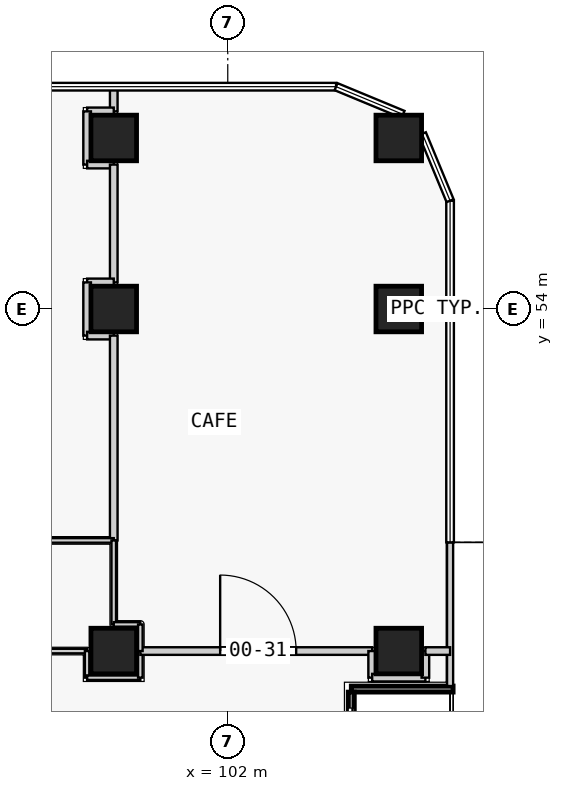
"""IFC4 building model, lengths in metres.
Left out: names, types, materials, properties, quantities, classifications, styles, units other than length and angle.
Written with IfcOpenShell. Run it as: python <this file> out.ifc"""

import sys

from ifc_helpers import new_model, si_unit, direction, frame, frame_2d, origin, origin_2d, place, context, subcontext, project, spatial, rectangle, extrude, element, fill, save


model = new_model("IFC4")
c1 = context("Model", 3, precision=1e-05, world=origin(), true_north=direction((0.0, 1.0)))
c2 = subcontext(c1, "Body", "Model", "MODEL_VIEW")
j1 = project(units=[si_unit("LENGTHUNIT", "METRE"), si_unit("PLANEANGLEUNIT", "RADIAN")], contexts=[c1])
p1 = place(None, origin())
s1 = spatial("IfcSite", under=j1, at=p1, CompositionType="ELEMENT")
p2 = place(p1, origin())
s2 = spatial("IfcBuilding", under=s1, at=p2, CompositionType="ELEMENT")
p3 = place(p2, origin())
s3 = spatial("IfcBuildingStorey", under=s2, at=p3, CompositionType="ELEMENT", Elevation=0.0)
for number, where, z_axis, x_axis in (
    (1, (99.0, 45.0, 0.0), (0.0, 0.0, 1.0), (1.0, 0.0, 0.0)),
    (2, (99.0, 54.0, 0.0), (0.0, 0.0, 1.0), (1.0, 0.0, 0.0)),
    (3, (99.0, 58.5, 0.0), (0.0, 0.0, 1.0), (1.0, 0.0, 0.0)),
    (4, (106.5, 45.0, 0.0), (0.0, 0.0, 1.0), (1.0, 0.0, 0.0)),
    (5, (106.5, 54.0, 0.0), (0.0, 0.0, 1.0), (1.0, 0.0, 0.0)),
    (6, (106.5, 58.5, 0.0), (0.0, 0.0, 1.0), (1.0, 0.0, 0.0)),
):
    element("IfcColumn", number, at=place(p3, frame(where, z_axis=z_axis, x_axis=x_axis)), inside=s3, PredefinedType="COLUMN", context=c2, shape_type="SweptSolid", body=[
        extrude(rectangle(XDim=1.2, YDim=1.2, at=origin_2d()), origin(), (0.0, 0.0, 1.0), 8.0),
    ])
p4 = place(p3, frame((105.25, 43.92, 0.0), z_axis=(0.0, 0.0, 1.0), x_axis=(0.0, -1.0, 0.0)))
e7 = element("IfcWall", 7, at=p4, inside=s3, PredefinedType="STANDARD", context=c2, shape_type="SweptSolid", body=[
    extrude(rectangle(XDim=6.84, YDim=0.16, at=frame_2d((3.42, 0.0))), origin(), (0.0, 0.0, 1.0), 7.65),
])
p5 = place(p4, frame((0.42, 0.0, 0.0)))
e8 = element("IfcOpeningElement", 8, at=p5, cuts=e7, PredefinedType="OPENING", context=c2, shape_type="SweptSolid", body=[
    extrude(rectangle(XDim=3.0, YDim=3.0, at=frame_2d((1.5, 1.5))), frame((0.0, 0.09, 0.0), z_axis=(0.0, -1.0, 0.0), x_axis=(1.0, 0.0, 0.0)), (0.0, 0.0, 1.0), 0.18),
])
p6 = place(p4, frame((3.42, 0.0, 0.0)))
e9 = element("IfcOpeningElement", 9, at=p6, cuts=e7, PredefinedType="OPENING", context=c2, shape_type="SweptSolid", body=[
    extrude(rectangle(XDim=3.0, YDim=3.0, at=frame_2d((1.5, 1.5))), frame((0.0, 0.09, 0.0), z_axis=(0.0, -1.0, 0.0), x_axis=(1.0, 0.0, 0.0)), (0.0, 0.0, 1.0), 0.18),
])
p7 = place(p3, frame((107.93, 44.0, 0.0), z_axis=(0.0, 0.0, 1.0), x_axis=(-1.0, 0.0, 0.0)))
e10 = element("IfcWall", 10, at=p7, inside=s3, PredefinedType="STANDARD", context=c2, shape_type="SweptSolid", body=[
    extrude(rectangle(XDim=2.68, YDim=0.16, at=frame_2d((1.34, 0.0))), origin(), (0.0, 0.0, 1.0), 7.65),
])
p8 = place(p3, frame((107.85, 47.86, 0.0), z_axis=(0.0, 0.0, 1.0), x_axis=(0.0, -1.0, 0.0)))
e11 = element("IfcWall", 11, at=p8, inside=s3, PredefinedType="STANDARD", context=c2, shape_type="SweptSolid", body=[
    extrude(rectangle(XDim=3.78, YDim=0.16, at=frame_2d((1.89, 0.0))), origin(), (0.0, 0.0, 1.0), 7.65),
])
p9 = place(p3, frame((99.0, 59.85, 0.0), z_axis=(0.0, 0.0, 1.0), x_axis=(0.0, -1.0, 0.0)))
e12 = element("IfcWall", 12, at=p9, inside=s3, PredefinedType="PARTITIONING", context=c2, shape_type="SweptSolid", body=[
    extrude(rectangle(XDim=0.65, YDim=0.2, at=frame_2d((0.325, 0.0))), origin(), (0.0, 0.0, 1.0), 7.65),
])
p10 = place(p3, frame((99.0, 59.2, 0.0), z_axis=(0.0, 0.0, 1.0), x_axis=(-1.0, 0.0, 0.0)))
e13 = element("IfcWall", 13, at=p10, inside=s3, PredefinedType="PARTITIONING", context=c2, shape_type="SweptSolid", body=[
    extrude(rectangle(XDim=0.7, YDim=0.2, at=frame_2d((0.35, 0.0))), origin(), (0.0, 0.0, 1.0), 7.65),
])
p11 = place(p3, frame((98.3, 59.2, 0.0), z_axis=(0.0, 0.0, 1.0), x_axis=(0.0, -1.0, 0.0)))
e14 = element("IfcWall", 14, at=p11, inside=s3, PredefinedType="PARTITIONING", context=c2, shape_type="SweptSolid", body=[
    extrude(rectangle(XDim=1.4, YDim=0.2, at=frame_2d((0.7, 0.0))), origin(), (0.0, 0.0, 1.0), 6.95),
])
p12 = place(p3, frame((98.3, 57.8, 0.0), z_axis=(0.0, 0.0, 1.0), x_axis=(1.0, 0.0, 0.0)))
e15 = element("IfcWall", 15, at=p12, inside=s3, PredefinedType="PARTITIONING", context=c2, shape_type="SweptSolid", body=[
    extrude(rectangle(XDim=0.7, YDim=0.2, at=frame_2d((0.35, 0.0))), origin(), (0.0, 0.0, 1.0), 6.95),
])
p13 = place(p3, frame((99.0, 57.8, 0.0), z_axis=(0.0, 0.0, 1.0), x_axis=(0.0, -1.0, 0.0)))
e16 = element("IfcWall", 16, at=p13, inside=s3, PredefinedType="PARTITIONING", context=c2, shape_type="SweptSolid", body=[
    extrude(rectangle(XDim=3.1, YDim=0.2, at=frame_2d((1.55, 0.0))), origin(), (0.0, 0.0, 1.0), 6.95),
])
p14 = place(p3, frame((99.0, 54.7, 0.0), z_axis=(0.0, 0.0, 1.0), x_axis=(-1.0, 0.0, 0.0)))
e17 = element("IfcWall", 17, at=p14, inside=s3, PredefinedType="PARTITIONING", context=c2, shape_type="SweptSolid", body=[
    extrude(rectangle(XDim=0.7, YDim=0.2, at=frame_2d((0.35, 0.0))), origin(), (0.0, 0.0, 1.0), 6.95),
])
p15 = place(p3, frame((98.3, 54.7, 0.0), z_axis=(0.0, 0.0, 1.0), x_axis=(0.0, -1.0, 0.0)))
e18 = element("IfcWall", 18, at=p15, inside=s3, PredefinedType="PARTITIONING", context=c2, shape_type="SweptSolid", body=[
    extrude(rectangle(XDim=1.4, YDim=0.2, at=frame_2d((0.7, 0.0))), origin(), (0.0, 0.0, 1.0), 6.95),
])
p16 = place(p3, frame((98.3, 53.3, 0.0), z_axis=(0.0, 0.0, 1.0), x_axis=(1.0, 0.0, 0.0)))
e19 = element("IfcWall", 19, at=p16, inside=s3, PredefinedType="PARTITIONING", context=c2, shape_type="SweptSolid", body=[
    extrude(rectangle(XDim=0.7, YDim=0.2, at=frame_2d((0.35, 0.0))), origin(), (0.0, 0.0, 1.0), 6.95),
])
p17 = place(p3, frame((99.0, 53.3, 0.0), z_axis=(0.0, 0.0, 1.0), x_axis=(0.0, -1.0, 0.0)))
e20 = element("IfcWall", 20, at=p17, inside=s3, PredefinedType="PARTITIONING", context=c2, shape_type="SweptSolid", body=[
    extrude(rectangle(XDim=5.389, YDim=0.2, at=frame_2d((2.695, 0.0))), origin(), (0.0, 0.0, 1.0), 6.95),
])
p18 = place(p3, frame((90.7, 45.0, 0.0), z_axis=(0.0, 0.0, 1.0), x_axis=(1.0, 0.0, 0.0)))
e21 = element("IfcWall", 21, at=p18, inside=s3, PredefinedType="PARTITIONING", context=c2, shape_type="SweptSolid", body=[
    extrude(rectangle(XDim=7.6, YDim=0.12, at=frame_2d((3.8, 0.0))), origin(), (0.0, 0.0, 1.0), 6.95),
])
p19 = place(p18, frame((3.35, 0.0, 0.0)))
e22 = element("IfcOpeningElement", 22, at=p19, cuts=e21, PredefinedType="OPENING", context=c2, shape_type="SweptSolid", body=[
    extrude(rectangle(XDim=1.0, YDim=2.1, at=frame_2d((0.5, 1.05))), frame((0.0, 0.07, 0.0), z_axis=(0.0, -1.0, 0.0), x_axis=(1.0, 0.0, 0.0)), (0.0, 0.0, 1.0), 0.14),
])
p20 = place(p3, frame((98.3, 45.0, 0.0), z_axis=(0.0, 0.0, 1.0), x_axis=(0.0, -1.0, 0.0)))
e23 = element("IfcWall", 23, at=p20, inside=s3, PredefinedType="PARTITIONING", context=c2, shape_type="SweptSolid", body=[
    extrude(rectangle(XDim=0.7, YDim=0.12, at=frame_2d((0.35, 0.0))), origin(), (0.0, 0.0, 1.0), 6.95),
])
p21 = place(p3, frame((98.3, 44.3, 0.0), z_axis=(0.0, 0.0, 1.0), x_axis=(1.0, 0.0, 0.0)))
e24 = element("IfcWall", 24, at=p21, inside=s3, PredefinedType="PARTITIONING", context=c2, shape_type="SweptSolid", body=[
    extrude(rectangle(XDim=1.4, YDim=0.12, at=frame_2d((0.7, 0.0))), origin(), (0.0, 0.0, 1.0), 6.95),
])
p22 = place(p3, frame((99.7, 44.3, 0.0), z_axis=(0.0, 0.0, 1.0), x_axis=(0.0, 1.0, 0.0)))
e25 = element("IfcWall", 25, at=p22, inside=s3, PredefinedType="PARTITIONING", context=c2, shape_type="SweptSolid", body=[
    extrude(rectangle(XDim=0.7, YDim=0.12, at=frame_2d((0.35, 0.0))), origin(), (0.0, 0.0, 1.0), 6.95),
])
p23 = place(p3, frame((99.0, 47.911, 0.0), z_axis=(0.0, 0.0, 1.0), x_axis=(-1.0, 0.0, 0.0)))
e26 = element("IfcWall", 26, at=p23, inside=s3, PredefinedType="PARTITIONING", context=c2, shape_type="SweptSolid", body=[
    extrude(rectangle(XDim=9.0, YDim=0.12, at=frame_2d((4.5, 0.0))), origin(), (0.0, 0.0, 1.0), 6.95),
])
p24 = place(p3, frame((99.7, 45.0, 0.0), z_axis=(0.0, 0.0, 1.0), x_axis=(1.0, 0.0, 0.0)))
e27 = element("IfcWall", 27, at=p24, inside=s3, PredefinedType="PARTITIONING", context=c2, shape_type="SweptSolid", body=[
    extrude(rectangle(XDim=6.1, YDim=0.2, at=frame_2d((3.05, 0.0))), origin(), (0.0, 0.0, 1.0), 6.95),
])
p25 = place(p24, frame((2.1, 0.0, 0.0)))
e28 = element("IfcOpeningElement", 28, at=p25, cuts=e27, PredefinedType="OPENING", context=c2, shape_type="SweptSolid", body=[
    extrude(rectangle(XDim=2.0, YDim=2.4, at=frame_2d((1.0, 1.2))), frame((0.0, 0.11, 0.0), z_axis=(0.0, -1.0, 0.0), x_axis=(1.0, 0.0, 0.0)), (0.0, 0.0, 1.0), 0.22),
])
p26 = place(p3, frame((105.8, 45.0, 0.0), z_axis=(0.0, 0.0, 1.0), x_axis=(0.0, -1.0, 0.0)))
e29 = element("IfcWall", 29, at=p26, inside=s3, PredefinedType="PARTITIONING", context=c2, shape_type="SweptSolid", body=[
    extrude(rectangle(XDim=0.7, YDim=0.2, at=frame_2d((0.35, 0.0))), origin(), (0.0, 0.0, 1.0), 6.95),
])
p27 = place(p3, frame((105.8, 44.3, 0.0), z_axis=(0.0, 0.0, 1.0), x_axis=(1.0, 0.0, 0.0)))
e30 = element("IfcWall", 30, at=p27, inside=s3, PredefinedType="PARTITIONING", context=c2, shape_type="SweptSolid", body=[
    extrude(rectangle(XDim=1.4, YDim=0.2, at=frame_2d((0.7, 0.0))), origin(), (0.0, 0.0, 1.0), 6.95),
])
p28 = place(p3, frame((107.2, 44.3, 0.0), z_axis=(0.0, 0.0, 1.0), x_axis=(0.0, 1.0, 0.0)))
e31 = element("IfcWall", 31, at=p28, inside=s3, PredefinedType="PARTITIONING", context=c2, shape_type="SweptSolid", body=[
    extrude(rectangle(XDim=0.7, YDim=0.2, at=frame_2d((0.35, 0.0))), origin(), (0.0, 0.0, 1.0), 7.65),
])
p29 = place(p3, frame((107.2, 45.0, 0.0), z_axis=(0.0, 0.0, 1.0), x_axis=(1.0, 0.0, 0.0)))
e32 = element("IfcWall", 32, at=p29, inside=s3, PredefinedType="PARTITIONING", context=c2, shape_type="SweptSolid", body=[
    extrude(rectangle(XDim=0.65, YDim=0.2, at=frame_2d((0.325, 0.0))), origin(), (0.0, 0.0, 1.0), 7.65),
])
p30 = place(p3, frame((99.0, 47.911, 0.0), z_axis=(0.0, 0.0, 1.0), x_axis=(0.0, -1.0, 0.0)))
e33 = element("IfcWall", 33, at=p30, inside=s3, PredefinedType="PARTITIONING", context=c2, shape_type="SweptSolid", body=[
    extrude(rectangle(XDim=2.211, YDim=0.12, at=frame_2d((1.105, 0.0))), origin(), (0.0, 0.0, 1.0), 6.95),
])
for number, where, z_axis, x_axis in (
    (34, (99.0, 45.7, 0.0), (0.0, 0.0, 1.0), (1.0, 0.0, 0.0)),
    (35, (99.7, 45.7, 0.0), (0.0, 0.0, 1.0), (0.0, -1.0, 0.0)),
):
    element("IfcWall", number, at=place(p3, frame(where, z_axis=z_axis, x_axis=x_axis)), inside=s3, PredefinedType="PARTITIONING", context=c2, shape_type="SweptSolid", body=[
        extrude(rectangle(XDim=0.7, YDim=0.12, at=frame_2d((0.35, 0.0))), origin(), (0.0, 0.0, 1.0), 6.95),
    ])
p31 = place(p5, origin())
e36 = element("IfcDoor", 36, at=p31, inside=s3, OperationType="SINGLE_SWING_LEFT", PredefinedType="DOOR", context=c2, shape_type="SweptSolid", body=[
    extrude(rectangle(XDim=3.0, YDim=3.0, at=frame_2d((1.5, 1.5))), frame((0.0, 0.025, 0.0), z_axis=(0.0, -1.0, 0.0), x_axis=(1.0, 0.0, 0.0)), (0.0, 0.0, 1.0), 0.05),
])
fill(e8, e36)
p32 = place(p25, origin())
e37 = element("IfcDoor", 37, at=p32, inside=s3, OperationType="SINGLE_SWING_LEFT", PredefinedType="DOOR", context=c2, shape_type="SweptSolid", body=[
    extrude(rectangle(XDim=2.0, YDim=2.4, at=frame_2d((1.0, 1.2))), frame((0.0, 0.025, 0.0), z_axis=(0.0, -1.0, 0.0), x_axis=(1.0, 0.0, 0.0)), (0.0, 0.0, 1.0), 0.05),
])
fill(e28, e37)
save(model, sys.argv[1])
